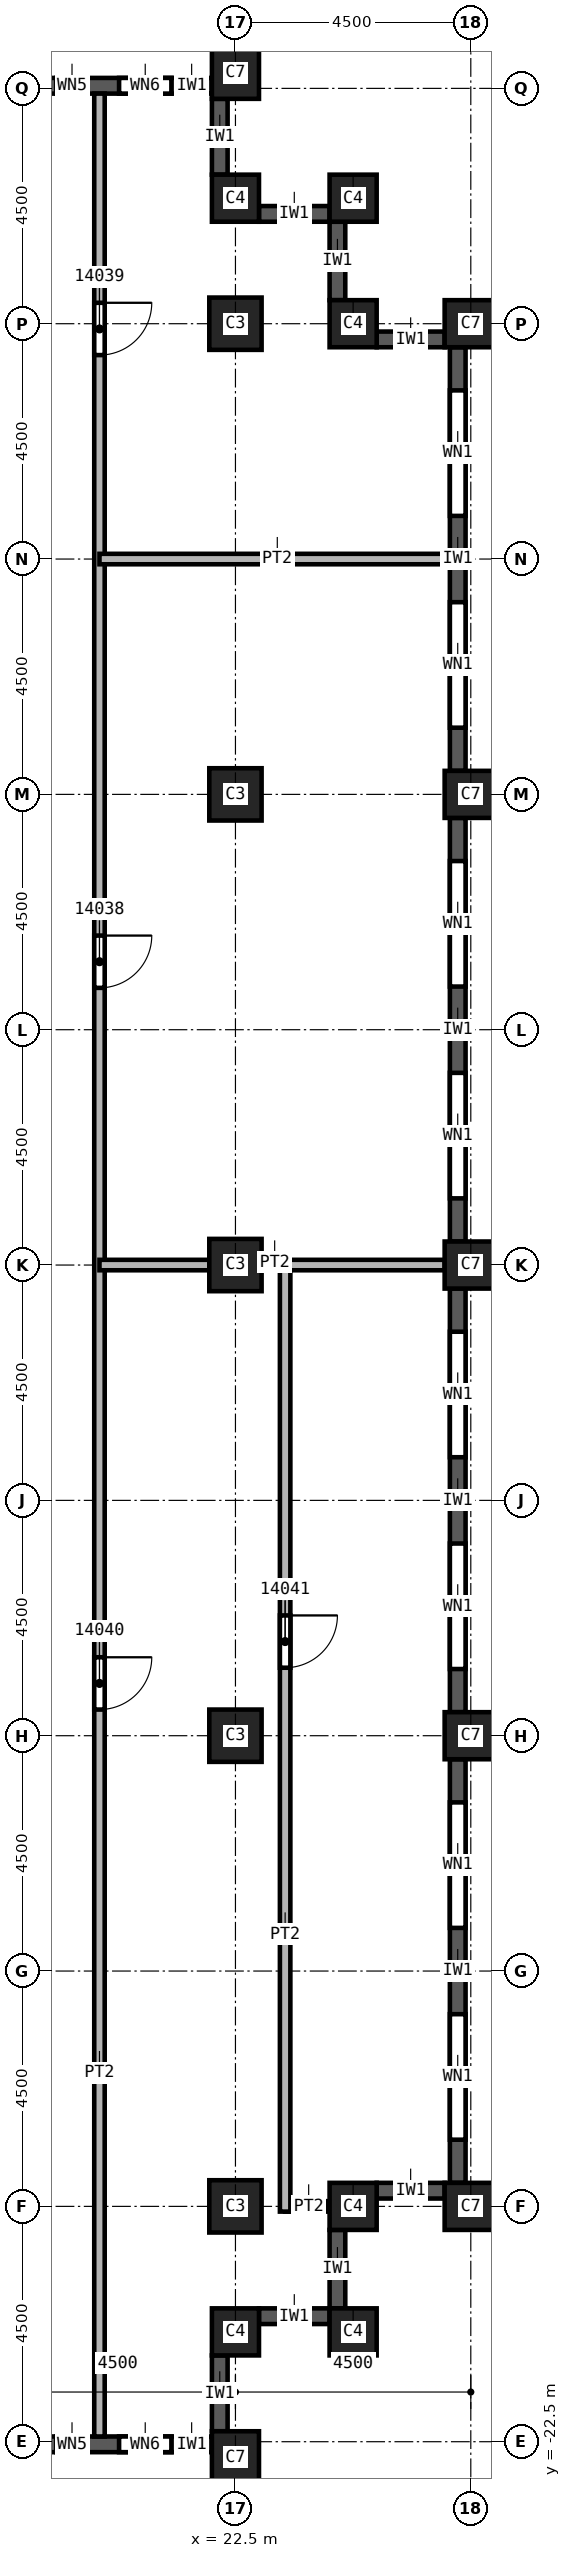
"""IFC4 building model, lengths in metres.
Left out: names, types, materials, properties, quantities, classifications, styles, units other than length and angle.
Written with IfcOpenShell. Run it as: python <this file> out.ifc"""

import sys

from ifc_helpers import new_model, si_unit, direction, frame, frame_2d, origin, origin_2d, place, context, subcontext, project, spatial, rectangle, extrude, element, fill, save


model = new_model("IFC4")
c1 = context("Model", 3, precision=1e-05, world=origin(), true_north=direction((0.0, 1.0)))
c2 = subcontext(c1, "Body", "Model", "MODEL_VIEW")
j1 = project(units=[si_unit("LENGTHUNIT", "METRE"), si_unit("PLANEANGLEUNIT", "RADIAN")], contexts=[c1])
p1 = place(None, origin())
s1 = spatial("IfcSite", under=j1, at=p1, CompositionType="ELEMENT")
p2 = place(p1, origin())
s2 = spatial("IfcBuilding", under=s1, at=p2, CompositionType="ELEMENT")
p3 = place(p2, frame((0.0, 0.0, 220.0)))
s3 = spatial("IfcBuildingStorey", under=s2, at=p3, CompositionType="ELEMENT", Elevation=220.0)
for number, where, z_axis, x_axis in (
    (1, (22.5, 0.0, 0.0), (0.0, 0.0, 1.0), (1.0, 0.0, 0.0)),
    (2, (22.5, 9.0, 0.0), (0.0, 0.0, 1.0), (1.0, 0.0, 0.0)),
    (3, (22.5, 18.0, 0.0), (0.0, 0.0, 1.0), (1.0, 0.0, 0.0)),
    (4, (22.5, -9.0, 0.0), (0.0, 0.0, 1.0), (1.0, 0.0, 0.0)),
    (5, (22.5, -18.0, 0.0), (0.0, 0.0, 1.0), (1.0, 0.0, 0.0)),
):
    element("IfcColumn", number, at=place(p3, frame(where, z_axis=z_axis, x_axis=x_axis)), inside=s3, PredefinedType="COLUMN", context=c2, shape_type="SweptSolid", body=[
        extrude(rectangle(XDim=1.0, YDim=1.0, at=origin_2d()), origin(), (0.0, 0.0, 1.0), 3.72),
    ])
for number, where, z_axis, x_axis in (
    (6, (27.0, 0.0, 0.0), (0.0, 0.0, 1.0), (0.0, 1.0, 0.0)),
    (7, (27.0, 9.0, 0.0), (0.0, 0.0, 1.0), (0.0, 1.0, 0.0)),
    (8, (27.0, 18.0, 0.0), (0.0, 0.0, 1.0), (0.0, 1.0, 0.0)),
    (9, (27.0, -9.0, 0.0), (0.0, 0.0, 1.0), (0.0, 1.0, 0.0)),
    (10, (27.0, -18.0, 0.0), (0.0, 0.0, 1.0), (0.0, 1.0, 0.0)),
    (11, (22.5, 22.8, 0.0), (0.0, 0.0, 1.0), (1.0, 0.0, 0.0)),
    (12, (22.5, -22.8, 0.0), (0.0, 0.0, 1.0), (1.0, 0.0, 0.0)),
):
    element("IfcColumn", number, at=place(p3, frame(where, z_axis=z_axis, x_axis=x_axis)), inside=s3, PredefinedType="COLUMN", context=c2, shape_type="SweptSolid", body=[
        extrude(rectangle(XDim=0.9, YDim=1.0, at=origin_2d()), origin(), (0.0, 0.0, 1.0), 3.72),
    ])
for number, where, z_axis, x_axis in (
    (13, (22.5, 20.4, 0.0), (0.0, 0.0, 1.0), (1.0, 0.0, 0.0)),
    (14, (24.75, 20.4, 0.0), (0.0, 0.0, 1.0), (1.0, 0.0, 0.0)),
    (15, (24.75, 18.0, 0.0), (0.0, 0.0, 1.0), (1.0, 0.0, 0.0)),
    (16, (22.5, -20.4, 0.0), (0.0, 0.0, 1.0), (1.0, 0.0, 0.0)),
    (17, (24.75, -20.4, 0.0), (0.0, 0.0, 1.0), (1.0, 0.0, 0.0)),
    (18, (24.75, -18.0, 0.0), (0.0, 0.0, 1.0), (1.0, 0.0, 0.0)),
):
    element("IfcColumn", number, at=place(p3, frame(where, z_axis=z_axis, x_axis=x_axis)), inside=s3, PredefinedType="COLUMN", context=c2, shape_type="SweptSolid", body=[
        extrude(rectangle(XDim=0.9, YDim=0.9, at=origin_2d()), origin(), (0.0, 0.0, 1.0), 3.72),
    ])
p4 = place(p3, frame((18.45, -22.55, 0.0), z_axis=(0.0, 0.0, 1.0), x_axis=(1.0, 0.0, 0.0)))
e19 = element("IfcWall", 19, at=p4, inside=s3, PredefinedType="SOLIDWALL", context=c2, shape_type="SweptSolid", body=[
    extrude(rectangle(XDim=3.6, YDim=0.3, at=frame_2d((1.8, 0.0))), origin(), (0.0, 0.0, 1.0), 3.12),
])
p5 = place(p4, frame((0.625, 0.0, 0.8)))
e20 = element("IfcOpeningElement", 20, at=p5, cuts=e19, PredefinedType="OPENING", context=c2, shape_type="SweptSolid", body=[
    extrude(rectangle(XDim=0.6, YDim=1.95, at=frame_2d((0.3, 0.975))), frame((0.0, 0.15, 0.0), z_axis=(0.0, -1.0, 0.0), x_axis=(1.0, 0.0, 0.0)), (0.0, 0.0, 1.0), 0.3),
])
p6 = place(p4, frame((1.825, 0.0, 0.8)))
e21 = element("IfcOpeningElement", 21, at=p6, cuts=e19, PredefinedType="OPENING", context=c2, shape_type="SweptSolid", body=[
    extrude(rectangle(XDim=1.0, YDim=1.95, at=frame_2d((0.5, 0.975))), frame((0.0, 0.15, 0.0), z_axis=(0.0, -1.0, 0.0), x_axis=(1.0, 0.0, 0.0)), (0.0, 0.0, 1.0), 0.3),
])
p7 = place(p3, frame((22.2, -22.3, 0.0), z_axis=(0.0, 0.0, 1.0), x_axis=(0.0, 1.0, 0.0)))
e22 = element("IfcWall", 22, at=p7, inside=s3, PredefinedType="SOLIDWALL", context=c2, shape_type="SweptSolid", body=[
    extrude(rectangle(XDim=1.45, YDim=0.3, at=frame_2d((0.725, 0.0))), origin(), (0.0, 0.0, 1.0), 3.12),
])
p8 = place(p3, frame((22.95, -20.1, 0.0), z_axis=(0.0, 0.0, 1.0), x_axis=(1.0, 0.0, 0.0)))
e23 = element("IfcWall", 23, at=p8, inside=s3, PredefinedType="SOLIDWALL", context=c2, shape_type="SweptSolid", body=[
    extrude(rectangle(XDim=1.35, YDim=0.3, at=frame_2d((0.675, 0.0))), origin(), (0.0, 0.0, 1.0), 3.12),
])
p9 = place(p3, frame((24.45, -19.95, 0.0), z_axis=(0.0, 0.0, 1.0), x_axis=(0.0, 1.0, 0.0)))
e24 = element("IfcWall", 24, at=p9, inside=s3, PredefinedType="SOLIDWALL", context=c2, shape_type="SweptSolid", body=[
    extrude(rectangle(XDim=1.5, YDim=0.3, at=frame_2d((0.75, 0.0))), origin(), (0.0, 0.0, 1.0), 3.12),
])
p10 = place(p3, frame((25.2, -17.7, 0.0), z_axis=(0.0, 0.0, 1.0), x_axis=(1.0, 0.0, 0.0)))
e25 = element("IfcWall", 25, at=p10, inside=s3, PredefinedType="SOLIDWALL", context=c2, shape_type="SweptSolid", body=[
    extrude(rectangle(XDim=1.3, YDim=0.3, at=frame_2d((0.65, 0.0))), origin(), (0.0, 0.0, 1.0), 3.12),
])
p11 = place(p3, frame((26.75, -17.55, 0.0), z_axis=(0.0, 0.0, 1.0), x_axis=(0.0, 1.0, 0.0)))
e26 = element("IfcWall", 26, at=p11, inside=s3, PredefinedType="SOLIDWALL", context=c2, shape_type="SweptSolid", body=[
    extrude(rectangle(XDim=8.1, YDim=0.3, at=frame_2d((4.05, 0.0))), origin(), (0.0, 0.0, 1.0), 3.12),
])
p12 = place(p11, frame((0.825, 0.0, 0.8)))
e27 = element("IfcOpeningElement", 27, at=p12, cuts=e26, PredefinedType="OPENING", context=c2, shape_type="SweptSolid", body=[
    extrude(rectangle(XDim=2.4, YDim=1.95, at=frame_2d((1.2, 0.975))), frame((0.0, 0.15, 0.0), z_axis=(0.0, -1.0, 0.0), x_axis=(1.0, 0.0, 0.0)), (0.0, 0.0, 1.0), 0.3),
])
p13 = place(p11, frame((4.875, 0.0, 0.8)))
e28 = element("IfcOpeningElement", 28, at=p13, cuts=e26, PredefinedType="OPENING", context=c2, shape_type="SweptSolid", body=[
    extrude(rectangle(XDim=2.4, YDim=1.95, at=frame_2d((1.2, 0.975))), frame((0.0, 0.15, 0.0), z_axis=(0.0, -1.0, 0.0), x_axis=(1.0, 0.0, 0.0)), (0.0, 0.0, 1.0), 0.3),
])
p14 = place(p3, frame((26.75, -8.55, 0.0), z_axis=(0.0, 0.0, 1.0), x_axis=(0.0, 1.0, 0.0)))
e29 = element("IfcWall", 29, at=p14, inside=s3, PredefinedType="SOLIDWALL", context=c2, shape_type="SweptSolid", body=[
    extrude(rectangle(XDim=8.1, YDim=0.3, at=frame_2d((4.05, 0.0))), origin(), (0.0, 0.0, 1.0), 3.12),
])
p15 = place(p14, frame((0.825, 0.0, 0.8)))
e30 = element("IfcOpeningElement", 30, at=p15, cuts=e29, PredefinedType="OPENING", context=c2, shape_type="SweptSolid", body=[
    extrude(rectangle(XDim=2.4, YDim=1.95, at=frame_2d((1.2, 0.975))), frame((0.0, 0.15, 0.0), z_axis=(0.0, -1.0, 0.0), x_axis=(1.0, 0.0, 0.0)), (0.0, 0.0, 1.0), 0.3),
])
p16 = place(p14, frame((4.875, 0.0, 0.8)))
e31 = element("IfcOpeningElement", 31, at=p16, cuts=e29, PredefinedType="OPENING", context=c2, shape_type="SweptSolid", body=[
    extrude(rectangle(XDim=2.4, YDim=1.95, at=frame_2d((1.2, 0.975))), frame((0.0, 0.15, 0.0), z_axis=(0.0, -1.0, 0.0), x_axis=(1.0, 0.0, 0.0)), (0.0, 0.0, 1.0), 0.3),
])
p17 = place(p3, frame((26.75, 0.45, 0.0), z_axis=(0.0, 0.0, 1.0), x_axis=(0.0, 1.0, 0.0)))
e32 = element("IfcWall", 32, at=p17, inside=s3, PredefinedType="SOLIDWALL", context=c2, shape_type="SweptSolid", body=[
    extrude(rectangle(XDim=8.1, YDim=0.3, at=frame_2d((4.05, 0.0))), origin(), (0.0, 0.0, 1.0), 3.12),
])
p18 = place(p17, frame((0.825, 0.0, 0.8)))
e33 = element("IfcOpeningElement", 33, at=p18, cuts=e32, PredefinedType="OPENING", context=c2, shape_type="SweptSolid", body=[
    extrude(rectangle(XDim=2.4, YDim=1.95, at=frame_2d((1.2, 0.975))), frame((0.0, 0.15, 0.0), z_axis=(0.0, -1.0, 0.0), x_axis=(1.0, 0.0, 0.0)), (0.0, 0.0, 1.0), 0.3),
])
p19 = place(p17, frame((4.875, 0.0, 0.8)))
e34 = element("IfcOpeningElement", 34, at=p19, cuts=e32, PredefinedType="OPENING", context=c2, shape_type="SweptSolid", body=[
    extrude(rectangle(XDim=2.4, YDim=1.95, at=frame_2d((1.2, 0.975))), frame((0.0, 0.15, 0.0), z_axis=(0.0, -1.0, 0.0), x_axis=(1.0, 0.0, 0.0)), (0.0, 0.0, 1.0), 0.3),
])
p20 = place(p3, frame((26.75, 9.45, 0.0), z_axis=(0.0, 0.0, 1.0), x_axis=(0.0, 1.0, 0.0)))
e35 = element("IfcWall", 35, at=p20, inside=s3, PredefinedType="SOLIDWALL", context=c2, shape_type="SweptSolid", body=[
    extrude(rectangle(XDim=8.1, YDim=0.3, at=frame_2d((4.05, 0.0))), origin(), (0.0, 0.0, 1.0), 3.12),
])
p21 = place(p20, frame((0.825, 0.0, 0.8)))
e36 = element("IfcOpeningElement", 36, at=p21, cuts=e35, PredefinedType="OPENING", context=c2, shape_type="SweptSolid", body=[
    extrude(rectangle(XDim=2.4, YDim=1.95, at=frame_2d((1.2, 0.975))), frame((0.0, 0.15, 0.0), z_axis=(0.0, -1.0, 0.0), x_axis=(1.0, 0.0, 0.0)), (0.0, 0.0, 1.0), 0.3),
])
p22 = place(p20, frame((4.875, 0.0, 0.8)))
e37 = element("IfcOpeningElement", 37, at=p22, cuts=e35, PredefinedType="OPENING", context=c2, shape_type="SweptSolid", body=[
    extrude(rectangle(XDim=2.4, YDim=1.95, at=frame_2d((1.2, 0.975))), frame((0.0, 0.15, 0.0), z_axis=(0.0, -1.0, 0.0), x_axis=(1.0, 0.0, 0.0)), (0.0, 0.0, 1.0), 0.3),
])
p23 = place(p3, frame((26.5, 17.7, 0.0), z_axis=(0.0, 0.0, 1.0), x_axis=(-1.0, 0.0, 0.0)))
e38 = element("IfcWall", 38, at=p23, inside=s3, PredefinedType="SOLIDWALL", context=c2, shape_type="SweptSolid", body=[
    extrude(rectangle(XDim=1.3, YDim=0.3, at=frame_2d((0.65, 0.0))), origin(), (0.0, 0.0, 1.0), 3.12),
])
p24 = place(p3, frame((24.45, 18.45, 0.0), z_axis=(0.0, 0.0, 1.0), x_axis=(0.0, 1.0, 0.0)))
e39 = element("IfcWall", 39, at=p24, inside=s3, PredefinedType="SOLIDWALL", context=c2, shape_type="SweptSolid", body=[
    extrude(rectangle(XDim=1.5, YDim=0.3, at=frame_2d((0.75, 0.0))), origin(), (0.0, 0.0, 1.0), 3.12),
])
p25 = place(p3, frame((24.3, 20.1, 0.0), z_axis=(0.0, 0.0, 1.0), x_axis=(-1.0, 0.0, 0.0)))
e40 = element("IfcWall", 40, at=p25, inside=s3, PredefinedType="SOLIDWALL", context=c2, shape_type="SweptSolid", body=[
    extrude(rectangle(XDim=1.35, YDim=0.3, at=frame_2d((0.675, 0.0))), origin(), (0.0, 0.0, 1.0), 3.12),
])
p26 = place(p3, frame((22.2, 20.85, 0.0), z_axis=(0.0, 0.0, 1.0), x_axis=(0.0, 1.0, 0.0)))
e41 = element("IfcWall", 41, at=p26, inside=s3, PredefinedType="SOLIDWALL", context=c2, shape_type="SweptSolid", body=[
    extrude(rectangle(XDim=1.45, YDim=0.3, at=frame_2d((0.725, 0.0))), origin(), (0.0, 0.0, 1.0), 3.12),
])
p27 = place(p3, frame((22.05, 22.55, 0.0), z_axis=(0.0, 0.0, 1.0), x_axis=(-1.0, 0.0, 0.0)))
e42 = element("IfcWall", 42, at=p27, inside=s3, PredefinedType="SOLIDWALL", context=c2, shape_type="SweptSolid", body=[
    extrude(rectangle(XDim=3.6, YDim=0.3, at=frame_2d((1.8, 0.0))), origin(), (0.0, 0.0, 1.0), 3.12),
])
p28 = place(p27, frame((0.775, 0.0, 0.8)))
e43 = element("IfcOpeningElement", 43, at=p28, cuts=e42, PredefinedType="OPENING", context=c2, shape_type="SweptSolid", body=[
    extrude(rectangle(XDim=1.0, YDim=1.95, at=frame_2d((0.5, 0.975))), frame((0.0, 0.15, 0.0), z_axis=(0.0, -1.0, 0.0), x_axis=(1.0, 0.0, 0.0)), (0.0, 0.0, 1.0), 0.3),
])
p29 = place(p27, frame((2.375, 0.0, 0.8)))
e44 = element("IfcOpeningElement", 44, at=p29, cuts=e42, PredefinedType="OPENING", context=c2, shape_type="SweptSolid", body=[
    extrude(rectangle(XDim=0.6, YDim=1.95, at=frame_2d((0.3, 0.975))), frame((0.0, 0.15, 0.0), z_axis=(0.0, -1.0, 0.0), x_axis=(1.0, 0.0, 0.0)), (0.0, 0.0, 1.0), 0.3),
])
p30 = place(p3, frame((19.9, 22.4, 0.0), z_axis=(0.0, 0.0, 1.0), x_axis=(0.0, -1.0, 0.0)))
e45 = element("IfcWall", 45, at=p30, inside=s3, PredefinedType="PARTITIONING", context=c2, shape_type="SweptSolid", body=[
    extrude(rectangle(XDim=44.8, YDim=0.2, at=frame_2d((22.4, 0.0))), origin(), (0.0, 0.0, 1.0), 3.72),
])
p31 = place(p30, frame((16.1, 0.0, 0.0)))
e46 = element("IfcOpeningElement", 46, at=p31, cuts=e45, PredefinedType="OPENING", context=c2, shape_type="SweptSolid", body=[
    extrude(rectangle(XDim=1.0, YDim=2.1, at=frame_2d((0.5, 1.05))), frame((0.0, 0.1, 0.0), z_axis=(0.0, -1.0, 0.0), x_axis=(1.0, 0.0, 0.0)), (0.0, 0.0, 1.0), 0.2),
])
p32 = place(p30, frame((4.0, 0.0, 0.0)))
e47 = element("IfcOpeningElement", 47, at=p32, cuts=e45, PredefinedType="OPENING", context=c2, shape_type="SweptSolid", body=[
    extrude(rectangle(XDim=1.0, YDim=2.1, at=frame_2d((0.5, 1.05))), frame((0.0, 0.1, 0.0), z_axis=(0.0, -1.0, 0.0), x_axis=(1.0, 0.0, 0.0)), (0.0, 0.0, 1.0), 0.2),
])
p33 = place(p30, frame((29.9, 0.0, 0.0)))
e48 = element("IfcOpeningElement", 48, at=p33, cuts=e45, PredefinedType="OPENING", context=c2, shape_type="SweptSolid", body=[
    extrude(rectangle(XDim=1.0, YDim=2.1, at=frame_2d((0.5, 1.05))), frame((0.0, 0.1, 0.0), z_axis=(0.0, -1.0, 0.0), x_axis=(1.0, 0.0, 0.0)), (0.0, 0.0, 1.0), 0.2),
])
p34 = place(p3, frame((19.9, 13.5, 0.0), z_axis=(0.0, 0.0, 1.0), x_axis=(1.0, 0.0, 0.0)))
e49 = element("IfcWall", 49, at=p34, inside=s3, PredefinedType="PARTITIONING", context=c2, shape_type="SweptSolid", body=[
    extrude(rectangle(XDim=6.7, YDim=0.2, at=frame_2d((3.35, 0.0))), origin(), (0.0, 0.0, 1.0), 3.72),
])
p35 = place(p3, frame((23.45, -18.0, 0.0), z_axis=(0.0, 0.0, 1.0), x_axis=(1.0, 0.0, 0.0)))
e50 = element("IfcWall", 50, at=p35, inside=s3, PredefinedType="PARTITIONING", context=c2, shape_type="SweptSolid", body=[
    extrude(rectangle(XDim=0.8, YDim=0.2, at=frame_2d((0.4, 0.0))), origin(), (0.0, 0.0, 1.0), 3.72),
])
p36 = place(p3, frame((23.45, 0.0, 0.0), z_axis=(0.0, 0.0, 1.0), x_axis=(0.0, -1.0, 0.0)))
e51 = element("IfcWall", 51, at=p36, inside=s3, PredefinedType="PARTITIONING", context=c2, shape_type="SweptSolid", body=[
    extrude(rectangle(XDim=18.1, YDim=0.2, at=frame_2d((9.05, 0.0))), origin(), (0.0, 0.0, 1.0), 3.72),
])
p37 = place(p36, frame((6.7, 0.0, 0.0)))
e52 = element("IfcOpeningElement", 52, at=p37, cuts=e51, PredefinedType="OPENING", context=c2, shape_type="SweptSolid", body=[
    extrude(rectangle(XDim=1.0, YDim=2.1, at=frame_2d((0.5, 1.05))), frame((0.0, 0.1, 0.0), z_axis=(0.0, -1.0, 0.0), x_axis=(1.0, 0.0, 0.0)), (0.0, 0.0, 1.0), 0.2),
])
p38 = place(p3, frame((26.5, 0.0, 0.0), z_axis=(0.0, 0.0, 1.0), x_axis=(-1.0, 0.0, 0.0)))
e53 = element("IfcWall", 53, at=p38, inside=s3, PredefinedType="PARTITIONING", context=c2, shape_type="SweptSolid", body=[
    extrude(rectangle(XDim=6.6, YDim=0.2, at=frame_2d((3.3, 0.0))), origin(), (0.0, 0.0, 1.0), 3.72),
])
p39 = place(p12, origin())
e54 = element("IfcWindow", 54, at=p39, inside=s3, PartitioningType="SINGLE_PANEL", PredefinedType="WINDOW", context=c2, shape_type="SweptSolid", body=[
    extrude(rectangle(XDim=2.4, YDim=1.95, at=frame_2d((1.2, 0.975))), frame((0.0, 0.03, 0.0), z_axis=(0.0, -1.0, 0.0), x_axis=(1.0, 0.0, 0.0)), (0.0, 0.0, 1.0), 0.06),
])
fill(e27, e54)
p40 = place(p13, origin())
e55 = element("IfcWindow", 55, at=p40, inside=s3, PartitioningType="SINGLE_PANEL", PredefinedType="WINDOW", context=c2, shape_type="SweptSolid", body=[
    extrude(rectangle(XDim=2.4, YDim=1.95, at=frame_2d((1.2, 0.975))), frame((0.0, 0.03, 0.0), z_axis=(0.0, -1.0, 0.0), x_axis=(1.0, 0.0, 0.0)), (0.0, 0.0, 1.0), 0.06),
])
fill(e28, e55)
p41 = place(p15, origin())
e56 = element("IfcWindow", 56, at=p41, inside=s3, PartitioningType="SINGLE_PANEL", PredefinedType="WINDOW", context=c2, shape_type="SweptSolid", body=[
    extrude(rectangle(XDim=2.4, YDim=1.95, at=frame_2d((1.2, 0.975))), frame((0.0, 0.03, 0.0), z_axis=(0.0, -1.0, 0.0), x_axis=(1.0, 0.0, 0.0)), (0.0, 0.0, 1.0), 0.06),
])
fill(e30, e56)
p42 = place(p16, origin())
e57 = element("IfcWindow", 57, at=p42, inside=s3, PartitioningType="SINGLE_PANEL", PredefinedType="WINDOW", context=c2, shape_type="SweptSolid", body=[
    extrude(rectangle(XDim=2.4, YDim=1.95, at=frame_2d((1.2, 0.975))), frame((0.0, 0.03, 0.0), z_axis=(0.0, -1.0, 0.0), x_axis=(1.0, 0.0, 0.0)), (0.0, 0.0, 1.0), 0.06),
])
fill(e31, e57)
p43 = place(p18, origin())
e58 = element("IfcWindow", 58, at=p43, inside=s3, PartitioningType="SINGLE_PANEL", PredefinedType="WINDOW", context=c2, shape_type="SweptSolid", body=[
    extrude(rectangle(XDim=2.4, YDim=1.95, at=frame_2d((1.2, 0.975))), frame((0.0, 0.03, 0.0), z_axis=(0.0, -1.0, 0.0), x_axis=(1.0, 0.0, 0.0)), (0.0, 0.0, 1.0), 0.06),
])
fill(e33, e58)
p44 = place(p19, origin())
e59 = element("IfcWindow", 59, at=p44, inside=s3, PartitioningType="SINGLE_PANEL", PredefinedType="WINDOW", context=c2, shape_type="SweptSolid", body=[
    extrude(rectangle(XDim=2.4, YDim=1.95, at=frame_2d((1.2, 0.975))), frame((0.0, 0.03, 0.0), z_axis=(0.0, -1.0, 0.0), x_axis=(1.0, 0.0, 0.0)), (0.0, 0.0, 1.0), 0.06),
])
fill(e34, e59)
p45 = place(p21, origin())
e60 = element("IfcWindow", 60, at=p45, inside=s3, PartitioningType="SINGLE_PANEL", PredefinedType="WINDOW", context=c2, shape_type="SweptSolid", body=[
    extrude(rectangle(XDim=2.4, YDim=1.95, at=frame_2d((1.2, 0.975))), frame((0.0, 0.03, 0.0), z_axis=(0.0, -1.0, 0.0), x_axis=(1.0, 0.0, 0.0)), (0.0, 0.0, 1.0), 0.06),
])
fill(e36, e60)
p46 = place(p22, origin())
e61 = element("IfcWindow", 61, at=p46, inside=s3, PartitioningType="SINGLE_PANEL", PredefinedType="WINDOW", context=c2, shape_type="SweptSolid", body=[
    extrude(rectangle(XDim=2.4, YDim=1.95, at=frame_2d((1.2, 0.975))), frame((0.0, 0.03, 0.0), z_axis=(0.0, -1.0, 0.0), x_axis=(1.0, 0.0, 0.0)), (0.0, 0.0, 1.0), 0.06),
])
fill(e37, e61)
p47 = place(p31, origin())
e62 = element("IfcDoor", 62, at=p47, inside=s3, OperationType="SINGLE_SWING_LEFT", PredefinedType="DOOR", context=c2, shape_type="SweptSolid", body=[
    extrude(rectangle(XDim=1.0, YDim=2.1, at=frame_2d((0.5, 1.05))), frame((0.0, 0.025, 0.0), z_axis=(0.0, -1.0, 0.0), x_axis=(1.0, 0.0, 0.0)), (0.0, 0.0, 1.0), 0.05),
])
fill(e46, e62)
p48 = place(p32, origin())
e63 = element("IfcDoor", 63, at=p48, inside=s3, OperationType="SINGLE_SWING_RIGHT", PredefinedType="DOOR", context=c2, shape_type="SweptSolid", body=[
    extrude(rectangle(XDim=1.0, YDim=2.1, at=frame_2d((0.5, 1.05))), frame((0.0, 0.025, 0.0), z_axis=(0.0, -1.0, 0.0), x_axis=(1.0, 0.0, 0.0)), (0.0, 0.0, 1.0), 0.05),
])
fill(e47, e63)
p49 = place(p33, origin())
e64 = element("IfcDoor", 64, at=p49, inside=s3, OperationType="SINGLE_SWING_LEFT", PredefinedType="DOOR", context=c2, shape_type="SweptSolid", body=[
    extrude(rectangle(XDim=1.0, YDim=2.1, at=frame_2d((0.5, 1.05))), frame((0.0, 0.025, 0.0), z_axis=(0.0, -1.0, 0.0), x_axis=(1.0, 0.0, 0.0)), (0.0, 0.0, 1.0), 0.05),
])
fill(e48, e64)
p50 = place(p37, origin())
e65 = element("IfcDoor", 65, at=p50, inside=s3, OperationType="SINGLE_SWING_RIGHT", PredefinedType="DOOR", context=c2, shape_type="SweptSolid", body=[
    extrude(rectangle(XDim=1.0, YDim=2.1, at=frame_2d((0.5, 1.05))), frame((0.0, 0.025, 0.0), z_axis=(0.0, -1.0, 0.0), x_axis=(1.0, 0.0, 0.0)), (0.0, 0.0, 1.0), 0.05),
])
fill(e52, e65)
p51 = place(p5, origin())
e66 = element("IfcWindow", 66, at=p51, inside=s3, PartitioningType="SINGLE_PANEL", PredefinedType="WINDOW", context=c2, shape_type="SweptSolid", body=[
    extrude(rectangle(XDim=0.6, YDim=1.95, at=frame_2d((0.3, 0.975))), frame((0.0, 0.03, 0.0), z_axis=(0.0, -1.0, 0.0), x_axis=(1.0, 0.0, 0.0)), (0.0, 0.0, 1.0), 0.06),
])
fill(e20, e66)
p52 = place(p6, origin())
e67 = element("IfcWindow", 67, at=p52, inside=s3, PartitioningType="SINGLE_PANEL", PredefinedType="WINDOW", context=c2, shape_type="SweptSolid", body=[
    extrude(rectangle(XDim=1.0, YDim=1.95, at=frame_2d((0.5, 0.975))), frame((0.0, 0.03, 0.0), z_axis=(0.0, -1.0, 0.0), x_axis=(1.0, 0.0, 0.0)), (0.0, 0.0, 1.0), 0.06),
])
fill(e21, e67)
p53 = place(p28, origin())
e68 = element("IfcWindow", 68, at=p53, inside=s3, PartitioningType="SINGLE_PANEL", PredefinedType="WINDOW", context=c2, shape_type="SweptSolid", body=[
    extrude(rectangle(XDim=1.0, YDim=1.95, at=frame_2d((0.5, 0.975))), frame((0.0, 0.03, 0.0), z_axis=(0.0, -1.0, 0.0), x_axis=(1.0, 0.0, 0.0)), (0.0, 0.0, 1.0), 0.06),
])
fill(e43, e68)
p54 = place(p29, origin())
e69 = element("IfcWindow", 69, at=p54, inside=s3, PartitioningType="SINGLE_PANEL", PredefinedType="WINDOW", context=c2, shape_type="SweptSolid", body=[
    extrude(rectangle(XDim=0.6, YDim=1.95, at=frame_2d((0.3, 0.975))), frame((0.0, 0.03, 0.0), z_axis=(0.0, -1.0, 0.0), x_axis=(1.0, 0.0, 0.0)), (0.0, 0.0, 1.0), 0.06),
])
fill(e44, e69)
save(model, sys.argv[1])
